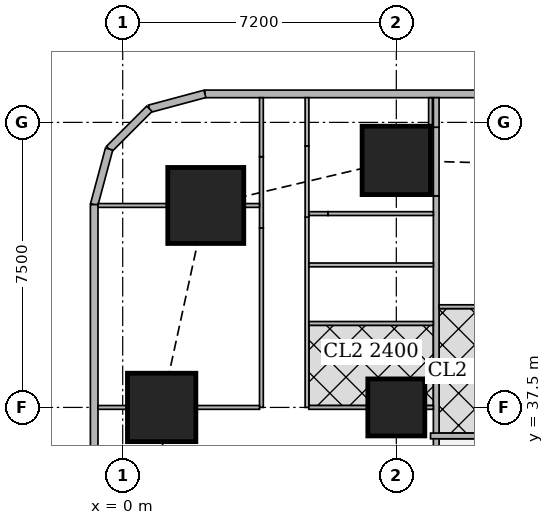
"""IFC4 building model, lengths in metres.
Left out: names, types, materials, properties, quantities, classifications, styles, units other than length and angle.
Written with IfcOpenShell. Run it as: python <this file> out.ifc"""

import sys

from ifc_helpers import new_model, si_unit, direction, frame, frame_2d, origin, origin_2d, place, context, subcontext, project, spatial, rectangle, extrude, element, fill, save


model = new_model("IFC4")
c1 = context("Model", 3, precision=1e-05, world=origin(), true_north=direction((0.0, 1.0)))
c2 = subcontext(c1, "Body", "Model", "MODEL_VIEW")
j1 = project(units=[si_unit("LENGTHUNIT", "METRE"), si_unit("PLANEANGLEUNIT", "RADIAN")], contexts=[c1])
p1 = place(None, origin())
s1 = spatial("IfcSite", under=j1, at=p1, CompositionType="ELEMENT")
p2 = place(p1, origin())
s2 = spatial("IfcBuilding", under=s1, at=p2, CompositionType="ELEMENT")
p3 = place(p2, frame((0.0, 0.0, 147.05)))
s3 = spatial("IfcBuildingStorey", under=s2, at=p3, CompositionType="ELEMENT", Elevation=147.05)
p4 = place(p3, frame((1.025, 37.5, 0.0), z_axis=(0.0, 0.0, 1.0), x_axis=(1.0, 0.0, 0.0)))
e1 = element("IfcColumn", 1, at=p4, inside=s3, PredefinedType="COLUMN", context=c2, shape_type="SweptSolid", body=[
    extrude(rectangle(XDim=1.8, YDim=1.8, at=origin_2d()), origin(), (0.0, 0.0, 1.0), 3.75),
])
p5 = place(p3, frame((7.2, 37.5, 0.0), z_axis=(0.0, 0.0, 1.0), x_axis=(1.0, 0.0, 0.0)))
e2 = element("IfcColumn", 2, at=p5, inside=s3, PredefinedType="COLUMN", context=c2, shape_type="SweptSolid", body=[
    extrude(rectangle(XDim=1.5, YDim=1.5, at=origin_2d()), origin(), (0.0, 0.0, 1.0), 3.75),
])
p6 = place(p3, frame((2.186, 42.814, 0.0), z_axis=(0.0, 0.0, 1.0), x_axis=(1.0, 0.0, 0.0)))
e3 = element("IfcColumn", 3, at=p6, inside=s3, PredefinedType="COLUMN", context=c2, shape_type="SweptSolid", body=[
    extrude(rectangle(XDim=2.0, YDim=2.0, at=origin_2d()), origin(), (0.0, 0.0, 1.0), 3.75),
])
p7 = place(p3, frame((7.2, 44.0, 0.0), z_axis=(0.0, 0.0, 1.0), x_axis=(1.0, 0.0, 0.0)))
e4 = element("IfcColumn", 4, at=p7, inside=s3, PredefinedType="COLUMN", context=c2, shape_type="SweptSolid", body=[
    extrude(rectangle(XDim=1.8, YDim=1.8, at=origin_2d()), origin(), (0.0, 0.0, 1.0), 3.75),
])
p8 = place(p3, frame((40.106, 45.75, 0.0), z_axis=(0.0, 0.0, 1.0), x_axis=(-1.0, 0.0, 0.0)))
e5 = element("IfcWall", 5, at=p8, inside=s3, PredefinedType="SOLIDWALL", context=c2, shape_type="SweptSolid", body=[
    extrude(rectangle(XDim=37.943, YDim=0.2, at=frame_2d((18.971, 0.0))), origin(), (0.0, 0.0, 1.0), 3.5),
])
p9 = place(p8, frame((8.606, 0.0, 0.9)))
e6 = element("IfcOpeningElement", 6, at=p9, cuts=e5, PredefinedType="OPENING", context=c2, shape_type="SweptSolid", body=[
    extrude(rectangle(XDim=1.8, YDim=1.5, at=frame_2d((0.9, 0.75))), frame((0.0, 0.11, 0.0), z_axis=(0.0, -1.0, 0.0), x_axis=(1.0, 0.0, 0.0)), (0.0, 0.0, 1.0), 0.22),
])
p10 = place(p8, frame((12.206, 0.0, 0.9)))
e7 = element("IfcOpeningElement", 7, at=p10, cuts=e5, PredefinedType="OPENING", context=c2, shape_type="SweptSolid", body=[
    extrude(rectangle(XDim=1.8, YDim=1.5, at=frame_2d((0.9, 0.75))), frame((0.0, 0.11, 0.0), z_axis=(0.0, -1.0, 0.0), x_axis=(1.0, 0.0, 0.0)), (0.0, 0.0, 1.0), 0.22),
])
p11 = place(p8, frame((15.806, 0.0, 0.9)))
e8 = element("IfcOpeningElement", 8, at=p11, cuts=e5, PredefinedType="OPENING", context=c2, shape_type="SweptSolid", body=[
    extrude(rectangle(XDim=1.8, YDim=1.5, at=frame_2d((0.9, 0.75))), frame((0.0, 0.11, 0.0), z_axis=(0.0, -1.0, 0.0), x_axis=(1.0, 0.0, 0.0)), (0.0, 0.0, 1.0), 0.22),
])
p12 = place(p8, frame((19.406, 0.0, 0.9)))
e9 = element("IfcOpeningElement", 9, at=p12, cuts=e5, PredefinedType="OPENING", context=c2, shape_type="SweptSolid", body=[
    extrude(rectangle(XDim=1.8, YDim=1.5, at=frame_2d((0.9, 0.75))), frame((0.0, 0.11, 0.0), z_axis=(0.0, -1.0, 0.0), x_axis=(1.0, 0.0, 0.0)), (0.0, 0.0, 1.0), 0.22),
])
p13 = place(p8, frame((23.006, 0.0, 0.9)))
e10 = element("IfcOpeningElement", 10, at=p13, cuts=e5, PredefinedType="OPENING", context=c2, shape_type="SweptSolid", body=[
    extrude(rectangle(XDim=1.8, YDim=1.5, at=frame_2d((0.9, 0.75))), frame((0.0, 0.11, 0.0), z_axis=(0.0, -1.0, 0.0), x_axis=(1.0, 0.0, 0.0)), (0.0, 0.0, 1.0), 0.22),
])
p14 = place(p8, frame((26.606, 0.0, 0.9)))
e11 = element("IfcOpeningElement", 11, at=p14, cuts=e5, PredefinedType="OPENING", context=c2, shape_type="SweptSolid", body=[
    extrude(rectangle(XDim=1.8, YDim=1.5, at=frame_2d((0.9, 0.75))), frame((0.0, 0.11, 0.0), z_axis=(0.0, -1.0, 0.0), x_axis=(1.0, 0.0, 0.0)), (0.0, 0.0, 1.0), 0.22),
])
p15 = place(p3, frame((2.163, 45.75, 0.0), z_axis=(0.0, 0.0, 1.0), x_axis=(-0.965832000415, -0.259168954497, 0.0)))
e12 = element("IfcWall", 12, at=p15, inside=s3, PredefinedType="SOLIDWALL", context=c2, shape_type="SweptSolid", body=[
    extrude(rectangle(XDim=1.513, YDim=0.2, at=frame_2d((0.756, 0.0))), origin(), (0.0, 0.0, 1.0), 3.5),
])
p16 = place(p3, frame((0.702, 45.358, 0.0), z_axis=(0.0, 0.0, 1.0), x_axis=(-0.707106781187, -0.707106781187, 0.0)))
e13 = element("IfcWall", 13, at=p16, inside=s3, PredefinedType="SOLIDWALL", context=c2, shape_type="SweptSolid", body=[
    extrude(rectangle(XDim=1.499, YDim=0.2, at=frame_2d((0.75, 0.0))), origin(), (0.0, 0.0, 1.0), 3.5),
])
p17 = place(p3, frame((-0.358, 44.298, 0.0), z_axis=(0.0, 0.0, 1.0), x_axis=(-0.259168954497, -0.965832000415, 0.0)))
e14 = element("IfcWall", 14, at=p17, inside=s3, PredefinedType="SOLIDWALL", context=c2, shape_type="SweptSolid", body=[
    extrude(rectangle(XDim=1.513, YDim=0.2, at=frame_2d((0.756, 0.0))), origin(), (0.0, 0.0, 1.0), 3.5),
])
p18 = place(p3, frame((-0.75, 42.837, 0.0), z_axis=(0.0, 0.0, 1.0), x_axis=(0.0, -1.0, 0.0)))
e15 = element("IfcWall", 15, at=p18, inside=s3, PredefinedType="SOLIDWALL", context=c2, shape_type="SweptSolid", body=[
    extrude(rectangle(XDim=40.674, YDim=0.2, at=frame_2d((20.337, 0.0))), origin(), (0.0, 0.0, 1.0), 3.5),
])
p19 = place(p18, frame((1.78, 0.0, 0.9)))
e16 = element("IfcOpeningElement", 16, at=p19, cuts=e15, PredefinedType="OPENING", context=c2, shape_type="SweptSolid", body=[
    extrude(rectangle(XDim=1.8, YDim=1.5, at=frame_2d((0.9, 0.75))), frame((0.0, 0.11, 0.0), z_axis=(0.0, -1.0, 0.0), x_axis=(1.0, 0.0, 0.0)), (0.0, 0.0, 1.0), 0.22),
])
p20 = place(p18, frame((6.312, 0.0, 0.9)))
e17 = element("IfcOpeningElement", 17, at=p20, cuts=e15, PredefinedType="OPENING", context=c2, shape_type="SweptSolid", body=[
    extrude(rectangle(XDim=1.8, YDim=1.5, at=frame_2d((0.9, 0.75))), frame((0.0, 0.11, 0.0), z_axis=(0.0, -1.0, 0.0), x_axis=(1.0, 0.0, 0.0)), (0.0, 0.0, 1.0), 0.22),
])
p21 = place(p18, frame((10.062, 0.0, 0.9)))
e18 = element("IfcOpeningElement", 18, at=p21, cuts=e15, PredefinedType="OPENING", context=c2, shape_type="SweptSolid", body=[
    extrude(rectangle(XDim=1.8, YDim=1.5, at=frame_2d((0.9, 0.75))), frame((0.0, 0.11, 0.0), z_axis=(0.0, -1.0, 0.0), x_axis=(1.0, 0.0, 0.0)), (0.0, 0.0, 1.0), 0.22),
])
p22 = place(p18, frame((13.812, 0.0, 0.9)))
e19 = element("IfcOpeningElement", 19, at=p22, cuts=e15, PredefinedType="OPENING", context=c2, shape_type="SweptSolid", body=[
    extrude(rectangle(XDim=1.8, YDim=1.5, at=frame_2d((0.9, 0.75))), frame((0.0, 0.11, 0.0), z_axis=(0.0, -1.0, 0.0), x_axis=(1.0, 0.0, 0.0)), (0.0, 0.0, 1.0), 0.22),
])
p23 = place(p18, frame((17.562, 0.0, 0.9)))
e20 = element("IfcOpeningElement", 20, at=p23, cuts=e15, PredefinedType="OPENING", context=c2, shape_type="SweptSolid", body=[
    extrude(rectangle(XDim=1.8, YDim=1.5, at=frame_2d((0.9, 0.75))), frame((0.0, 0.11, 0.0), z_axis=(0.0, -1.0, 0.0), x_axis=(1.0, 0.0, 0.0)), (0.0, 0.0, 1.0), 0.22),
])
p24 = place(p18, frame((21.312, 0.0, 0.9)))
e21 = element("IfcOpeningElement", 21, at=p24, cuts=e15, PredefinedType="OPENING", context=c2, shape_type="SweptSolid", body=[
    extrude(rectangle(XDim=1.8, YDim=1.5, at=frame_2d((0.9, 0.75))), frame((0.0, 0.11, 0.0), z_axis=(0.0, -1.0, 0.0), x_axis=(1.0, 0.0, 0.0)), (0.0, 0.0, 1.0), 0.22),
])
p25 = place(p18, frame((25.062, 0.0, 0.9)))
e22 = element("IfcOpeningElement", 22, at=p25, cuts=e15, PredefinedType="OPENING", context=c2, shape_type="SweptSolid", body=[
    extrude(rectangle(XDim=1.8, YDim=1.5, at=frame_2d((0.9, 0.75))), frame((0.0, 0.11, 0.0), z_axis=(0.0, -1.0, 0.0), x_axis=(1.0, 0.0, 0.0)), (0.0, 0.0, 1.0), 0.22),
])
p26 = place(p18, frame((28.812, 0.0, 0.9)))
e23 = element("IfcOpeningElement", 23, at=p26, cuts=e15, PredefinedType="OPENING", context=c2, shape_type="SweptSolid", body=[
    extrude(rectangle(XDim=1.8, YDim=1.5, at=frame_2d((0.9, 0.75))), frame((0.0, 0.11, 0.0), z_axis=(0.0, -1.0, 0.0), x_axis=(1.0, 0.0, 0.0)), (0.0, 0.0, 1.0), 0.22),
])
p27 = place(p18, frame((32.562, 0.0, 0.9)))
e24 = element("IfcOpeningElement", 24, at=p27, cuts=e15, PredefinedType="OPENING", context=c2, shape_type="SweptSolid", body=[
    extrude(rectangle(XDim=1.8, YDim=1.5, at=frame_2d((0.9, 0.75))), frame((0.0, 0.11, 0.0), z_axis=(0.0, -1.0, 0.0), x_axis=(1.0, 0.0, 0.0)), (0.0, 0.0, 1.0), 0.22),
])
p28 = place(p18, frame((37.094, 0.0, 0.9)))
e25 = element("IfcOpeningElement", 25, at=p28, cuts=e15, PredefinedType="OPENING", context=c2, shape_type="SweptSolid", body=[
    extrude(rectangle(XDim=1.8, YDim=1.5, at=frame_2d((0.9, 0.75))), frame((0.0, 0.11, 0.0), z_axis=(0.0, -1.0, 0.0), x_axis=(1.0, 0.0, 0.0)), (0.0, 0.0, 1.0), 0.22),
])
p29 = place(p3, frame((8.25, 1.957, 0.0), z_axis=(0.0, 0.0, 1.0), x_axis=(0.0, 1.0, 0.0)))
e26 = element("IfcWall", 26, at=p29, inside=s3, PredefinedType="SOLIDWALL", context=c2, shape_type="SweptSolid", body=[
    extrude(rectangle(XDim=41.111, YDim=0.15, at=frame_2d((20.556, 0.0))), origin(), (0.0, 0.0, 1.0), 3.5),
])
p30 = place(p29, frame((14.418, 0.0, 0.0)))
e27 = element("IfcOpeningElement", 27, at=p30, cuts=e26, PredefinedType="OPENING", context=c2, shape_type="SweptSolid", body=[
    extrude(rectangle(XDim=1.0, YDim=2.1, at=frame_2d((0.5, 1.05))), frame((0.0, 0.085, 0.0), z_axis=(0.0, -1.0, 0.0), x_axis=(1.0, 0.0, 0.0)), (0.0, 0.0, 1.0), 0.17),
])
p31 = place(p29, frame((18.168, 0.0, 0.0)))
e28 = element("IfcOpeningElement", 28, at=p31, cuts=e26, PredefinedType="OPENING", context=c2, shape_type="SweptSolid", body=[
    extrude(rectangle(XDim=1.0, YDim=2.1, at=frame_2d((0.5, 1.05))), frame((0.0, 0.085, 0.0), z_axis=(0.0, -1.0, 0.0), x_axis=(1.0, 0.0, 0.0)), (0.0, 0.0, 1.0), 0.17),
])
p32 = place(p29, frame((33.168, 0.0, 0.0)))
e29 = element("IfcOpeningElement", 29, at=p32, cuts=e26, PredefinedType="OPENING", context=c2, shape_type="SweptSolid", body=[
    extrude(rectangle(XDim=1.0, YDim=2.1, at=frame_2d((0.5, 1.05))), frame((0.0, 0.085, 0.0), z_axis=(0.0, -1.0, 0.0), x_axis=(1.0, 0.0, 0.0)), (0.0, 0.0, 1.0), 0.17),
])
p33 = place(p3, frame((8.25, 43.068, 0.0), z_axis=(0.0, 0.0, 1.0), x_axis=(0.0, 1.0, 0.0)))
e30 = element("IfcWall", 30, at=p33, inside=s3, PredefinedType="SOLIDWALL", context=c2, shape_type="SweptSolid", body=[
    extrude(rectangle(XDim=1.805, YDim=0.15, at=frame_2d((0.902, 0.0))), origin(), (0.0, 0.0, 1.0), 2.1),
])
p34 = place(p3, frame((8.25, 44.873, 0.0), z_axis=(0.0, 0.0, 1.0), x_axis=(0.0, 1.0, 0.0)))
e31 = element("IfcWall", 31, at=p34, inside=s3, PredefinedType="SOLIDWALL", context=c2, shape_type="SweptSolid", body=[
    extrude(rectangle(XDim=0.777, YDim=0.15, at=frame_2d((0.388, 0.0))), origin(), (0.0, 0.0, 1.0), 3.5),
])
p35 = place(p3, frame((8.1, 36.75, 0.0), z_axis=(0.0, 0.0, 1.0), x_axis=(1.0, 0.0, 0.0)))
e32 = element("IfcWall", 32, at=p35, inside=s3, PredefinedType="SOLIDWALL", context=c2, shape_type="SweptSolid", body=[
    extrude(rectangle(XDim=5.549, YDim=0.15, at=frame_2d((2.774, 0.0))), origin(), (0.0, 0.0, 1.0), 3.5),
])
p36 = place(p35, frame((3.739, 0.0, 0.0)))
e33 = element("IfcOpeningElement", 33, at=p36, cuts=e32, PredefinedType="OPENING", context=c2, shape_type="SweptSolid", body=[
    extrude(rectangle(XDim=1.0, YDim=2.1, at=frame_2d((0.5, 1.05))), frame((0.0, 0.085, 0.0), z_axis=(0.0, -1.0, 0.0), x_axis=(1.0, 0.0, 0.0)), (0.0, 0.0, 1.0), 0.17),
])
p37 = place(p3, frame((8.1, 45.65, 0.0), z_axis=(0.0, 0.0, 1.0), x_axis=(0.0, -1.0, 0.0)))
e34 = element("IfcWall", 34, at=p37, inside=s3, PredefinedType="PARTITIONING", context=c2, shape_type="SweptSolid", body=[
    extrude(rectangle(XDim=0.749, YDim=0.1, at=frame_2d((0.375, 0.0))), origin(), (0.0, 0.0, 1.0), 3.5),
])
p38 = place(p3, frame((3.65, 37.5, 0.0), z_axis=(0.0, 0.0, 1.0), x_axis=(0.0, 1.0, 0.0)))
e35 = element("IfcWall", 35, at=p38, inside=s3, PredefinedType="PARTITIONING", context=c2, shape_type="SweptSolid", body=[
    extrude(rectangle(XDim=4.724, YDim=0.1, at=frame_2d((2.362, 0.0))), origin(), (0.0, 0.0, 1.0), 3.5),
])
p39 = place(p38, frame((0.2, 0.0, 0.0)))
e36 = element("IfcOpeningElement", 36, at=p39, cuts=e35, PredefinedType="OPENING", context=c2, shape_type="SweptSolid", body=[
    extrude(rectangle(XDim=0.9, YDim=2.1, at=frame_2d((0.45, 1.05))), frame((0.0, 0.06, 0.0), z_axis=(0.0, -1.0, 0.0), x_axis=(1.0, 0.0, 0.0)), (0.0, 0.0, 1.0), 0.12),
])
p40 = place(p3, frame((3.65, 42.224, 0.0), z_axis=(0.0, 0.0, 1.0), x_axis=(0.0, 1.0, 0.0)))
e37 = element("IfcWall", 37, at=p40, inside=s3, PredefinedType="PARTITIONING", context=c2, shape_type="SweptSolid", body=[
    extrude(rectangle(XDim=1.873, YDim=0.1, at=frame_2d((0.937, 0.0))), origin(), (0.0, 0.0, 1.0), 2.1),
])
p41 = place(p3, frame((3.65, 44.097, 0.0), z_axis=(0.0, 0.0, 1.0), x_axis=(0.0, 1.0, 0.0)))
e38 = element("IfcWall", 38, at=p41, inside=s3, PredefinedType="PARTITIONING", context=c2, shape_type="SweptSolid", body=[
    extrude(rectangle(XDim=1.553, YDim=0.1, at=frame_2d((0.776, 0.0))), origin(), (0.0, 0.0, 1.0), 3.5),
])
p42 = place(p3, frame((4.85, 37.5, 0.0), z_axis=(0.0, 0.0, 1.0), x_axis=(0.0, 1.0, 0.0)))
e39 = element("IfcWall", 39, at=p42, inside=s3, PredefinedType="PARTITIONING", context=c2, shape_type="SweptSolid", body=[
    extrude(rectangle(XDim=5.007, YDim=0.1, at=frame_2d((2.503, 0.0))), origin(), (0.0, 0.0, 1.0), 3.5),
])
p43 = place(p42, frame((0.655, 0.0, 0.0)))
e40 = element("IfcOpeningElement", 40, at=p43, cuts=e39, PredefinedType="OPENING", context=c2, shape_type="SweptSolid", body=[
    extrude(rectangle(XDim=0.9, YDim=2.1, at=frame_2d((0.45, 1.05))), frame((0.0, 0.06, 0.0), z_axis=(0.0, -1.0, 0.0), x_axis=(1.0, 0.0, 0.0)), (0.0, 0.0, 1.0), 0.12),
])
p44 = place(p42, frame((2.53, 0.0, 0.0)))
e41 = element("IfcOpeningElement", 41, at=p44, cuts=e39, PredefinedType="OPENING", context=c2, shape_type="SweptSolid", body=[
    extrude(rectangle(XDim=0.9, YDim=2.1, at=frame_2d((0.45, 1.05))), frame((0.0, 0.06, 0.0), z_axis=(0.0, -1.0, 0.0), x_axis=(1.0, 0.0, 0.0)), (0.0, 0.0, 1.0), 0.12),
])
p45 = place(p3, frame((4.85, 42.507, 0.0), z_axis=(0.0, 0.0, 1.0), x_axis=(0.0, 1.0, 0.0)))
e42 = element("IfcWall", 42, at=p45, inside=s3, PredefinedType="PARTITIONING", context=c2, shape_type="SweptSolid", body=[
    extrude(rectangle(XDim=1.874, YDim=0.1, at=frame_2d((0.937, 0.0))), origin(), (0.0, 0.0, 1.0), 2.1),
])
p46 = place(p3, frame((4.85, 44.381, 0.0), z_axis=(0.0, 0.0, 1.0), x_axis=(0.0, 1.0, 0.0)))
e43 = element("IfcWall", 43, at=p46, inside=s3, PredefinedType="PARTITIONING", context=c2, shape_type="SweptSolid", body=[
    extrude(rectangle(XDim=1.269, YDim=0.1, at=frame_2d((0.634, 0.0))), origin(), (0.0, 0.0, 1.0), 3.5),
])
p47 = place(p46, frame((0.15, 0.0, 0.0)))
e44 = element("IfcOpeningElement", 44, at=p47, cuts=e43, PredefinedType="OPENING", context=c2, shape_type="SweptSolid", body=[
    extrude(rectangle(XDim=0.9, YDim=2.1, at=frame_2d((0.45, 1.05))), frame((0.0, 0.06, 0.0), z_axis=(0.0, -1.0, 0.0), x_axis=(1.0, 0.0, 0.0)), (0.0, 0.0, 1.0), 0.12),
])
p48 = place(p3, frame((-0.65, 37.5, 0.0), z_axis=(0.0, 0.0, 1.0), x_axis=(1.0, 0.0, 0.0)))
e45 = element("IfcWall", 45, at=p48, inside=s3, PredefinedType="PARTITIONING", context=c2, shape_type="SweptSolid", body=[
    extrude(rectangle(XDim=0.774, YDim=0.1, at=frame_2d((0.387, 0.0))), origin(), (0.0, 0.0, 1.0), 3.5),
])
p49 = place(p3, frame((1.926, 37.5, 0.0), z_axis=(0.0, 0.0, 1.0), x_axis=(1.0, 0.0, 0.0)))
e46 = element("IfcWall", 46, at=p49, inside=s3, PredefinedType="PARTITIONING", context=c2, shape_type="SweptSolid", body=[
    extrude(rectangle(XDim=1.674, YDim=0.1, at=frame_2d((0.837, 0.0))), origin(), (0.0, 0.0, 1.0), 2.1),
])
p50 = place(p3, frame((-0.65, 42.814, 0.0), z_axis=(0.0, 0.0, 1.0), x_axis=(1.0, 0.0, 0.0)))
e47 = element("IfcWall", 47, at=p50, inside=s3, PredefinedType="PARTITIONING", context=c2, shape_type="SweptSolid", body=[
    extrude(rectangle(XDim=1.835, YDim=0.1, at=frame_2d((0.917, 0.0))), origin(), (0.0, 0.0, 1.0), 3.5),
])
p51 = place(p3, frame((3.187, 42.814, 0.0), z_axis=(0.0, 0.0, 1.0), x_axis=(1.0, 0.0, 0.0)))
e48 = element("IfcWall", 48, at=p51, inside=s3, PredefinedType="PARTITIONING", context=c2, shape_type="SweptSolid", body=[
    extrude(rectangle(XDim=0.413, YDim=0.1, at=frame_2d((0.207, 0.0))), origin(), (0.0, 0.0, 1.0), 2.1),
])
p52 = place(p3, frame((4.9, 37.5, 0.0), z_axis=(0.0, 0.0, 1.0), x_axis=(1.0, 0.0, 0.0)))
e49 = element("IfcWall", 49, at=p52, inside=s3, PredefinedType="PARTITIONING", context=c2, shape_type="SweptSolid", body=[
    extrude(rectangle(XDim=1.549, YDim=0.1, at=frame_2d((0.774, 0.0))), origin(), (0.0, 0.0, 1.0), 3.5),
])
p53 = place(p3, frame((7.951, 37.5, 0.0), z_axis=(0.0, 0.0, 1.0), x_axis=(1.0, 0.0, 0.0)))
e50 = element("IfcWall", 50, at=p53, inside=s3, PredefinedType="PARTITIONING", context=c2, shape_type="SweptSolid", body=[
    extrude(rectangle(XDim=0.224, YDim=0.1, at=frame_2d((0.112, 0.0))), origin(), (0.0, 0.0, 1.0), 3.5),
])
for number, where, z_axis, x_axis in (
    (51, (4.9, 41.25, 0.0), (0.0, 0.0, 1.0), (1.0, 0.0, 0.0)),
    (52, (4.9, 39.71, 0.0), (0.0, 0.0, 1.0), (1.0, 0.0, 0.0)),
):
    element("IfcWall", number, at=place(p3, frame(where, z_axis=z_axis, x_axis=x_axis)), inside=s3, PredefinedType="PARTITIONING", context=c2, shape_type="SweptSolid", body=[
        extrude(rectangle(XDim=3.275, YDim=0.1, at=frame_2d((1.638, 0.0))), origin(), (0.0, 0.0, 1.0), 3.5),
    ])
p54 = place(p3, frame((8.325, 40.15, 0.0), z_axis=(0.0, 0.0, 1.0), x_axis=(1.0, 0.0, 0.0)))
e53 = element("IfcWall", 53, at=p54, inside=s3, PredefinedType="PARTITIONING", context=c2, shape_type="SweptSolid", body=[
    extrude(rectangle(XDim=1.954, YDim=0.1, at=frame_2d((0.977, 0.0))), origin(), (0.0, 0.0, 1.0), 3.5),
])
p55 = place(p54, frame((0.475, 0.0, 0.0)))
e54 = element("IfcOpeningElement", 54, at=p55, cuts=e53, PredefinedType="OPENING", context=c2, shape_type="SweptSolid", body=[
    extrude(rectangle(XDim=0.9, YDim=2.1, at=frame_2d((0.45, 1.05))), frame((0.0, 0.06, 0.0), z_axis=(0.0, -1.0, 0.0), x_axis=(1.0, 0.0, 0.0)), (0.0, 0.0, 1.0), 0.12),
])
p56 = place(p3, frame((4.9, 42.6, 0.0), z_axis=(0.0, 0.0, 1.0), x_axis=(1.0, 0.0, 0.0)))
e55 = element("IfcWall", 55, at=p56, inside=s3, PredefinedType="PARTITIONING", context=c2, shape_type="SweptSolid", body=[
    extrude(rectangle(XDim=0.503, YDim=0.1, at=frame_2d((0.251, 0.0))), origin(), (0.0, 0.0, 1.0), 2.1),
])
p57 = place(p3, frame((5.403, 42.6, 0.0), z_axis=(0.0, 0.0, 1.0), x_axis=(1.0, 0.0, 0.0)))
e56 = element("IfcWall", 56, at=p57, inside=s3, PredefinedType="PARTITIONING", context=c2, shape_type="SweptSolid", body=[
    extrude(rectangle(XDim=2.772, YDim=0.1, at=frame_2d((1.386, 0.0))), origin(), (0.0, 0.0, 1.0), 3.5),
])
p58 = place(p57, frame((0.15, 0.0, 0.0)))
e57 = element("IfcOpeningElement", 57, at=p58, cuts=e56, PredefinedType="OPENING", context=c2, shape_type="SweptSolid", body=[
    extrude(rectangle(XDim=0.9, YDim=2.1, at=frame_2d((0.45, 1.05))), frame((0.0, 0.06, 0.0), z_axis=(0.0, -1.0, 0.0), x_axis=(1.0, 0.0, 0.0)), (0.0, 0.0, 1.0), 0.12),
])
p59 = place(p19, origin())
e58 = element("IfcWindow", 58, at=p59, inside=s3, PartitioningType="SINGLE_PANEL", PredefinedType="WINDOW", context=c2, shape_type="SweptSolid", body=[
    extrude(rectangle(XDim=1.8, YDim=1.5, at=frame_2d((0.9, 0.75))), frame((0.0, 0.03, 0.0), z_axis=(0.0, -1.0, 0.0), x_axis=(1.0, 0.0, 0.0)), (0.0, 0.0, 1.0), 0.06),
])
fill(e16, e58)
p60 = place(p20, origin())
e59 = element("IfcWindow", 59, at=p60, inside=s3, PartitioningType="SINGLE_PANEL", PredefinedType="WINDOW", context=c2, shape_type="SweptSolid", body=[
    extrude(rectangle(XDim=1.8, YDim=1.5, at=frame_2d((0.9, 0.75))), frame((0.0, 0.03, 0.0), z_axis=(0.0, -1.0, 0.0), x_axis=(1.0, 0.0, 0.0)), (0.0, 0.0, 1.0), 0.06),
])
fill(e17, e59)
p61 = place(p39, origin())
e60 = element("IfcDoor", 60, at=p61, inside=s3, OperationType="SINGLE_SWING_LEFT", PredefinedType="DOOR", context=c2, shape_type="SweptSolid", body=[
    extrude(rectangle(XDim=0.9, YDim=2.1, at=frame_2d((0.45, 1.05))), frame((0.0, 0.025, 0.0), z_axis=(0.0, -1.0, 0.0), x_axis=(1.0, 0.0, 0.0)), (0.0, 0.0, 1.0), 0.05),
])
fill(e36, e60)
p62 = place(p43, origin())
e61 = element("IfcDoor", 61, at=p62, inside=s3, OperationType="SINGLE_SWING_RIGHT", PredefinedType="DOOR", context=c2, shape_type="SweptSolid", body=[
    extrude(rectangle(XDim=0.9, YDim=2.1, at=frame_2d((0.45, 1.05))), frame((0.0, 0.025, 0.0), z_axis=(0.0, -1.0, 0.0), x_axis=(1.0, 0.0, 0.0)), (0.0, 0.0, 1.0), 0.05),
])
fill(e40, e61)
p63 = place(p47, origin())
e62 = element("IfcDoor", 62, at=p63, inside=s3, OperationType="SINGLE_SWING_RIGHT", PredefinedType="DOOR", context=c2, shape_type="SweptSolid", body=[
    extrude(rectangle(XDim=0.9, YDim=2.1, at=frame_2d((0.45, 1.05))), frame((0.0, 0.025, 0.0), z_axis=(0.0, -1.0, 0.0), x_axis=(1.0, 0.0, 0.0)), (0.0, 0.0, 1.0), 0.05),
])
fill(e44, e62)
p64 = place(p44, origin())
e63 = element("IfcDoor", 63, at=p64, inside=s3, OperationType="SINGLE_SWING_LEFT", PredefinedType="DOOR", context=c2, shape_type="SweptSolid", body=[
    extrude(rectangle(XDim=0.9, YDim=2.1, at=frame_2d((0.45, 1.05))), frame((0.0, 0.025, 0.0), z_axis=(0.0, -1.0, 0.0), x_axis=(1.0, 0.0, 0.0)), (0.0, 0.0, 1.0), 0.05),
])
fill(e41, e63)
p65 = place(p55, origin())
e64 = element("IfcDoor", 64, at=p65, inside=s3, OperationType="SINGLE_SWING_RIGHT", PredefinedType="DOOR", context=c2, shape_type="SweptSolid", body=[
    extrude(rectangle(XDim=0.9, YDim=2.1, at=frame_2d((0.45, 1.05))), frame((0.0, 0.025, 0.0), z_axis=(0.0, -1.0, 0.0), x_axis=(1.0, 0.0, 0.0)), (0.0, 0.0, 1.0), 0.05),
])
fill(e54, e64)
p66 = place(p58, origin())
e65 = element("IfcDoor", 65, at=p66, inside=s3, OperationType="SINGLE_SWING_LEFT", PredefinedType="DOOR", context=c2, shape_type="SweptSolid", body=[
    extrude(rectangle(XDim=0.9, YDim=2.1, at=frame_2d((0.45, 1.05))), frame((0.0, 0.025, 0.0), z_axis=(0.0, -1.0, 0.0), x_axis=(1.0, 0.0, 0.0)), (0.0, 0.0, 1.0), 0.05),
])
fill(e57, e65)
save(model, sys.argv[1])
